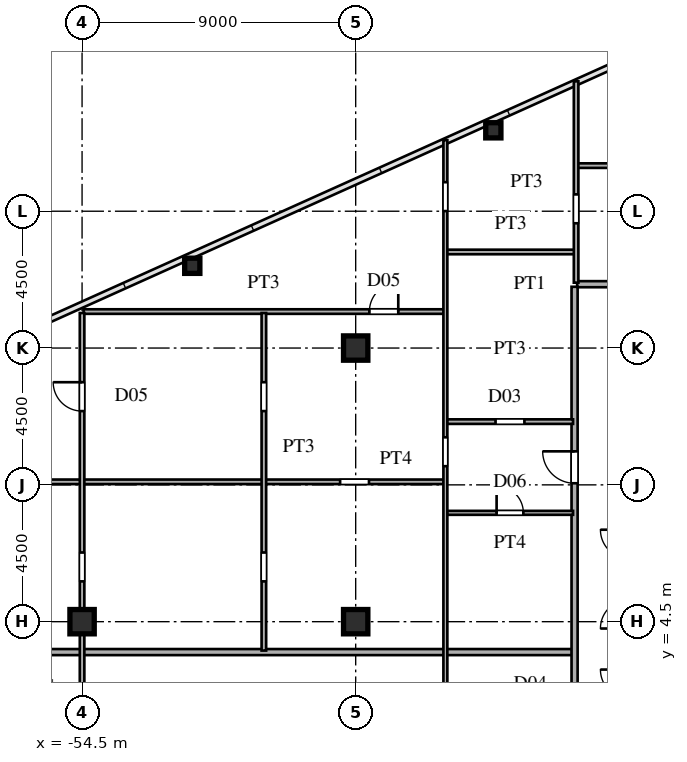
"""IFC4 building model, lengths in metres.
Left out: names, types, materials, properties, quantities, classifications, styles, units other than length and angle.
Written with IfcOpenShell. Run it as: python <this file> out.ifc"""

import sys

from ifc_helpers import new_model, si_unit, direction, frame, frame_2d, origin, origin_2d, place, context, subcontext, project, spatial, rectangle, hollow_rectangle, i_section, extrude, source, transform, mapped, element, fill, save


model = new_model("IFC4")
c1 = context("Model", 3, precision=1e-05, world=origin(), true_north=direction((0.0, 1.0)))
c2 = subcontext(c1, "Body", "Model", "MODEL_VIEW")
j1 = project(units=[si_unit("LENGTHUNIT", "METRE"), si_unit("PLANEANGLEUNIT", "RADIAN")], contexts=[c1])
p1 = place(None, origin())
s1 = spatial("IfcSite", under=j1, at=p1, CompositionType="ELEMENT")
p2 = place(p1, origin())
s2 = spatial("IfcBuilding", under=s1, at=p2, CompositionType="ELEMENT")
p3 = place(p2, frame((0.0, 0.0, 103.2)))
s3 = spatial("IfcBuildingStorey", under=s2, at=p3, CompositionType="ELEMENT", Elevation=103.2)
m1 = source(origin(), c2, "Body", "SweptSolid", [
    extrude(i_section(OverallWidth=0.8, OverallDepth=0.8, WebThickness=0.032, FlangeThickness=0.05, at=origin_2d()), origin(), (0.0, 0.0, 1.0), 3.6),
])
for number, where, z_axis, x_axis in (
    (1, (-45.5, 4.5, 0.0), (0.0, 0.0, 1.0), (1.0, 0.0, 0.0)),
    (2, (-45.5, 13.5, 0.0), (0.0, 0.0, 1.0), (1.0, 0.0, 0.0)),
    (3, (-54.5, 4.5, 0.0), (0.0, 0.0, 1.0), (1.0, 0.0, 0.0)),
):
    element("IfcColumn", number, at=place(p3, frame(where, z_axis=z_axis, x_axis=x_axis)), inside=s3, PredefinedType="COLUMN", context=c2, shape_type="MappedRepresentation", body=[
        mapped(m1, transform((0.0, 0.0, 0.0), scale=1.0)),
    ])
m2 = source(origin(), c2, "Body", "SweptSolid", [
    extrude(hollow_rectangle(XDim=0.5, YDim=0.5, WallThickness=0.02, at=origin_2d()), origin(), (0.0, 0.0, 1.0), 3.6),
])
for number, where, z_axis, x_axis in (
    (4, (-40.973, 20.661, 0.0), (0.0, 0.0, 1.0), (1.0, 0.0, 0.0)),
    (5, (-50.875, 16.205, 0.0), (0.0, 0.0, 1.0), (1.0, 0.0, 0.0)),
):
    element("IfcColumn", number, at=place(p3, frame(where, z_axis=z_axis, x_axis=x_axis)), inside=s3, PredefinedType="COLUMN", context=c2, shape_type="MappedRepresentation", body=[
        mapped(m2, transform((0.0, 0.0, 0.0), scale=1.0)),
    ])
p4 = place(p3, frame((-71.005, 3.5, 0.0), z_axis=(0.0, 0.0, 1.0), x_axis=(1.0, 0.0, 0.0)))
e6 = element("IfcWall", 6, at=p4, inside=s3, PredefinedType="PARTITIONING", context=c2, shape_type="SweptSolid", body=[
    extrude(rectangle(XDim=32.625, YDim=0.2, at=frame_2d((16.312, 0.0))), origin(), (0.0, 0.0, 1.0), 3.38),
])
p5 = place(p3, frame((-42.5, 8.08, 0.0), z_axis=(0.0, 0.0, 1.0), x_axis=(1.0, 0.0, 0.0)))
e7 = element("IfcWall", 7, at=p5, inside=s3, PredefinedType="PARTITIONING", context=c2, shape_type="SweptSolid", body=[
    extrude(rectangle(XDim=4.15, YDim=0.13, at=frame_2d((2.075, 0.0))), origin(), (0.0, 0.0, 1.0), 3.38),
])
p6 = place(p5, frame((1.635, 0.0, 0.0)))
e8 = element("IfcOpeningElement", 8, at=p6, cuts=e7, PredefinedType="OPENING", context=c2, shape_type="SweptSolid", body=[
    extrude(rectangle(XDim=0.88, YDim=2.1, at=frame_2d((0.44, 1.05))), frame((0.0, 0.075, 0.0), z_axis=(0.0, -1.0, 0.0), x_axis=(1.0, 0.0, 0.0)), (0.0, 0.0, 1.0), 0.15),
])
p7 = place(p3, frame((-67.478, 9.1, 0.0), z_axis=(0.0, 0.0, 1.0), x_axis=(1.0, 0.0, 0.0)))
e9 = element("IfcWall", 9, at=p7, inside=s3, PredefinedType="PARTITIONING", context=c2, shape_type="SweptSolid", body=[
    extrude(rectangle(XDim=24.878, YDim=0.15, at=frame_2d((12.439, 0.0))), origin(), (0.0, 0.0, 1.0), 3.38),
])
p8 = place(p7, frame((21.466, 0.0, 0.0)))
e10 = element("IfcOpeningElement", 10, at=p8, cuts=e9, PredefinedType="OPENING", context=c2, shape_type="SweptSolid", body=[
    extrude(rectangle(XDim=0.95, YDim=2.15, at=frame_2d((0.475, 1.075))), frame((0.0, 0.085, 0.0), z_axis=(0.0, -1.0, 0.0), x_axis=(1.0, 0.0, 0.0)), (0.0, 0.0, 1.0), 0.17),
])
p9 = place(p3, frame((-42.5, 11.08, 0.0), z_axis=(0.0, 0.0, 1.0), x_axis=(1.0, 0.0, 0.0)))
e11 = element("IfcWall", 11, at=p9, inside=s3, PredefinedType="PARTITIONING", context=c2, shape_type="SweptSolid", body=[
    extrude(rectangle(XDim=4.15, YDim=0.15, at=frame_2d((2.075, 0.0))), origin(), (0.0, 0.0, 1.0), 3.38),
])
p10 = place(p9, frame((1.6, 0.0, 0.0)))
e12 = element("IfcOpeningElement", 12, at=p10, cuts=e11, PredefinedType="OPENING", context=c2, shape_type="SweptSolid", body=[
    extrude(rectangle(XDim=0.95, YDim=2.15, at=frame_2d((0.475, 1.075))), frame((0.0, 0.085, 0.0), z_axis=(0.0, -1.0, 0.0), x_axis=(1.0, 0.0, 0.0)), (0.0, 0.0, 1.0), 0.17),
])
p11 = place(p3, frame((-54.45, 14.7, 0.0), z_axis=(0.0, 0.0, 1.0), x_axis=(1.0, 0.0, 0.0)))
e13 = element("IfcWall", 13, at=p11, inside=s3, PredefinedType="PARTITIONING", context=c2, shape_type="SweptSolid", body=[
    extrude(rectangle(XDim=11.85, YDim=0.15, at=frame_2d((5.925, 0.0))), origin(), (0.0, 0.0, 1.0), 3.38),
])
p12 = place(p11, frame((9.401, 0.0, 0.0)))
e14 = element("IfcOpeningElement", 14, at=p12, cuts=e13, PredefinedType="OPENING", context=c2, shape_type="SweptSolid", body=[
    extrude(rectangle(XDim=0.95, YDim=2.15, at=frame_2d((0.475, 1.075))), frame((0.0, 0.085, 0.0), z_axis=(0.0, -1.0, 0.0), x_axis=(1.0, 0.0, 0.0)), (0.0, 0.0, 1.0), 0.17),
])
p13 = place(p3, frame((-38.215, 15.6, 0.0), z_axis=(0.0, 0.0, 1.0), x_axis=(1.0, 0.0, 0.0)))
e15 = element("IfcWall", 15, at=p13, inside=s3, PredefinedType="PARTITIONING", context=c2, shape_type="SweptSolid", body=[
    extrude(rectangle(XDim=1.63, YDim=0.2, at=frame_2d((0.815, 0.0))), origin(), (0.0, 0.0, 1.0), 3.38),
])
p14 = place(p3, frame((-42.5, 16.66, 0.0), z_axis=(0.0, 0.0, 1.0), x_axis=(1.0, 0.0, 0.0)))
e16 = element("IfcWall", 16, at=p14, inside=s3, PredefinedType="PARTITIONING", context=c2, shape_type="SweptSolid", body=[
    extrude(rectangle(XDim=4.2, YDim=0.15, at=frame_2d((2.1, 0.0))), origin(), (0.0, 0.0, 1.0), 3.38),
])
p15 = place(p3, frame((-38.2, 19.5, 0.0), z_axis=(0.0, 0.0, 1.0), x_axis=(1.0, 0.0, 0.0)))
e17 = element("IfcWall", 17, at=p15, inside=s3, PredefinedType="PARTITIONING", context=c2, shape_type="SweptSolid", body=[
    extrude(rectangle(XDim=10.735, YDim=0.15, at=frame_2d((5.367, 0.0))), origin(), (0.0, 0.0, 1.0), 3.38),
])
p16 = place(p15, frame((4.85, 0.0, 0.0)))
e18 = element("IfcOpeningElement", 18, at=p16, cuts=e17, PredefinedType="OPENING", context=c2, shape_type="SweptSolid", body=[
    extrude(rectangle(XDim=0.95, YDim=2.15, at=frame_2d((0.475, 1.075))), frame((0.0, 0.085, 0.0), z_axis=(0.0, -1.0, 0.0), x_axis=(1.0, 0.0, 0.0)), (0.0, 0.0, 1.0), 0.17),
])
p17 = place(p3, frame((-54.5, -14.96, 0.0), z_axis=(0.0, 0.0, 1.0), x_axis=(0.0, 1.0, 0.0)))
e19 = element("IfcWall", 19, at=p17, inside=s3, PredefinedType="PARTITIONING", context=c2, shape_type="SweptSolid", body=[
    extrude(rectangle(XDim=29.612, YDim=0.15, at=frame_2d((14.806, 0.0))), origin(), (0.0, 0.0, 1.0), 2.68),
])
p18 = place(p17, frame((1.772, 0.0, 0.0)))
e20 = element("IfcOpeningElement", 20, at=p18, cuts=e19, PredefinedType="OPENING", context=c2, shape_type="SweptSolid", body=[
    extrude(rectangle(XDim=0.95, YDim=2.15, at=frame_2d((0.475, 1.075))), frame((0.0, 0.085, 0.0), z_axis=(0.0, -1.0, 0.0), x_axis=(1.0, 0.0, 0.0)), (0.0, 0.0, 1.0), 0.17),
])
p19 = place(p17, frame((10.985, 0.0, 0.0)))
e21 = element("IfcOpeningElement", 21, at=p19, cuts=e19, PredefinedType="OPENING", context=c2, shape_type="SweptSolid", body=[
    extrude(rectangle(XDim=0.95, YDim=2.15, at=frame_2d((0.475, 1.075))), frame((0.0, 0.085, 0.0), z_axis=(0.0, -1.0, 0.0), x_axis=(1.0, 0.0, 0.0)), (0.0, 0.0, 1.0), 0.17),
])
p20 = place(p17, frame((26.386, 0.0, 0.0)))
e22 = element("IfcOpeningElement", 22, at=p20, cuts=e19, PredefinedType="OPENING", context=c2, shape_type="SweptSolid", body=[
    extrude(rectangle(XDim=0.95, YDim=2.15, at=frame_2d((0.475, 1.075))), frame((0.0, 0.085, 0.0), z_axis=(0.0, -1.0, 0.0), x_axis=(1.0, 0.0, 0.0)), (0.0, 0.0, 1.0), 0.17),
])
p21 = place(p17, frame((20.785, 0.0, 0.0)))
e23 = element("IfcOpeningElement", 23, at=p21, cuts=e19, PredefinedType="OPENING", context=c2, shape_type="SweptSolid", body=[
    extrude(rectangle(XDim=0.95, YDim=2.15, at=frame_2d((0.475, 1.075))), frame((0.0, 0.085, 0.0), z_axis=(0.0, -1.0, 0.0), x_axis=(1.0, 0.0, 0.0)), (0.0, 0.0, 1.0), 0.17),
])
p22 = place(p3, frame((-48.52, 3.55, 0.0), z_axis=(0.0, 0.0, 1.0), x_axis=(0.0, 1.0, 0.0)))
e24 = element("IfcWall", 24, at=p22, inside=s3, PredefinedType="PARTITIONING", context=c2, shape_type="SweptSolid", body=[
    extrude(rectangle(XDim=11.102, YDim=0.15, at=frame_2d((5.551, 0.0))), origin(), (0.0, 0.0, 1.0), 3.38),
])
p23 = place(p22, frame((7.876, 0.0, 0.0)))
e25 = element("IfcOpeningElement", 25, at=p23, cuts=e24, PredefinedType="OPENING", context=c2, shape_type="SweptSolid", body=[
    extrude(rectangle(XDim=0.95, YDim=2.15, at=frame_2d((0.475, 1.075))), frame((0.0, 0.085, 0.0), z_axis=(0.0, -1.0, 0.0), x_axis=(1.0, 0.0, 0.0)), (0.0, 0.0, 1.0), 0.17),
])
p24 = place(p22, frame((2.275, 0.0, 0.0)))
e26 = element("IfcOpeningElement", 26, at=p24, cuts=e24, PredefinedType="OPENING", context=c2, shape_type="SweptSolid", body=[
    extrude(rectangle(XDim=0.95, YDim=2.15, at=frame_2d((0.475, 1.075))), frame((0.0, 0.085, 0.0), z_axis=(0.0, -1.0, 0.0), x_axis=(1.0, 0.0, 0.0)), (0.0, 0.0, 1.0), 0.17),
])
p25 = place(p3, frame((-42.55, -0.648, 0.0), z_axis=(0.0, 0.0, 1.0), x_axis=(0.0, 1.0, 0.0)))
e27 = element("IfcWall", 27, at=p25, inside=s3, PredefinedType="PARTITIONING", context=c2, shape_type="SweptSolid", body=[
    extrude(rectangle(XDim=20.985, YDim=0.13, at=frame_2d((10.492, 0.0))), origin(), (0.0, 0.0, 1.0), 3.38),
])
p26 = place(p25, frame((10.262, 0.0, 0.0)))
e28 = element("IfcOpeningElement", 28, at=p26, cuts=e27, PredefinedType="OPENING", context=c2, shape_type="SweptSolid", body=[
    extrude(rectangle(XDim=0.95, YDim=2.15, at=frame_2d((0.475, 1.075))), frame((0.0, 0.075, 0.0), z_axis=(0.0, -1.0, 0.0), x_axis=(1.0, 0.0, 0.0)), (0.0, 0.0, 1.0), 0.15),
])
p27 = place(p25, frame((18.653, 0.0, 0.0)))
e29 = element("IfcOpeningElement", 29, at=p27, cuts=e27, PredefinedType="OPENING", context=c2, shape_type="SweptSolid", body=[
    extrude(rectangle(XDim=0.95, YDim=2.15, at=frame_2d((0.475, 1.075))), frame((0.0, 0.075, 0.0), z_axis=(0.0, -1.0, 0.0), x_axis=(1.0, 0.0, 0.0)), (0.0, 0.0, 1.0), 0.15),
])
p28 = place(p3, frame((-38.3, -15.515, 0.0), z_axis=(0.0, 0.0, 1.0), x_axis=(0.0, 1.0, 0.0)))
e30 = element("IfcWall", 30, at=p28, inside=s3, PredefinedType="PARTITIONING", context=c2, shape_type="SweptSolid", body=[
    extrude(rectangle(XDim=31.03, YDim=0.2, at=frame_2d((15.515, 0.0))), origin(), (0.0, 0.0, 1.0), 3.38),
])
p29 = place(p28, frame((0.617, 0.0, 0.0)))
e31 = element("IfcOpeningElement", 31, at=p29, cuts=e30, PredefinedType="OPENING", context=c2, shape_type="SweptSolid", body=[
    extrude(rectangle(XDim=1.05, YDim=2.25, at=frame_2d((0.525, 1.125))), frame((0.0, 0.11, 0.0), z_axis=(0.0, -1.0, 0.0), x_axis=(1.0, 0.0, 0.0)), (0.0, 0.0, 1.0), 0.22),
])
p30 = place(p28, frame((11.28, 0.0, 0.0)))
e32 = element("IfcOpeningElement", 32, at=p30, cuts=e30, PredefinedType="OPENING", context=c2, shape_type="SweptSolid", body=[
    extrude(rectangle(XDim=1.05, YDim=2.25, at=frame_2d((0.525, 1.125))), frame((0.0, 0.11, 0.0), z_axis=(0.0, -1.0, 0.0), x_axis=(1.0, 0.0, 0.0)), (0.0, 0.0, 1.0), 0.22),
])
p31 = place(p28, frame((24.567, 0.0, 0.0)))
e33 = element("IfcOpeningElement", 33, at=p31, cuts=e30, PredefinedType="OPENING", context=c2, shape_type="SweptSolid", body=[
    extrude(rectangle(XDim=1.05, YDim=2.25, at=frame_2d((0.525, 1.125))), frame((0.0, 0.11, 0.0), z_axis=(0.0, -1.0, 0.0), x_axis=(1.0, 0.0, 0.0)), (0.0, 0.0, 1.0), 0.22),
])
p32 = place(p3, frame((-38.25, 15.65, 0.0), z_axis=(0.0, 0.0, 1.0), x_axis=(0.0, 1.0, 0.0)))
e34 = element("IfcWall", 34, at=p32, inside=s3, PredefinedType="PARTITIONING", context=c2, shape_type="SweptSolid", body=[
    extrude(rectangle(XDim=6.623, YDim=0.15, at=frame_2d((3.312, 0.0))), origin(), (0.0, 0.0, 1.0), 3.38),
])
p33 = place(p32, frame((1.954, 0.0, 0.0)))
e35 = element("IfcOpeningElement", 35, at=p33, cuts=e34, PredefinedType="OPENING", context=c2, shape_type="SweptSolid", body=[
    extrude(rectangle(XDim=0.95, YDim=2.15, at=frame_2d((0.475, 1.075))), frame((0.0, 0.085, 0.0), z_axis=(0.0, -1.0, 0.0), x_axis=(1.0, 0.0, 0.0)), (0.0, 0.0, 1.0), 0.17),
])
m3 = source(origin(), c2, "Body", "SweptSolid", [
    extrude(rectangle(XDim=0.88, YDim=2.1, at=frame_2d((0.44, 1.05))), frame((0.0, 0.025, 0.0), z_axis=(0.0, -1.0, 0.0), x_axis=(1.0, 0.0, 0.0)), (0.0, 0.0, 1.0), 0.05),
])
p34 = place(p6, origin())
e36 = element("IfcDoor", 36, at=p34, inside=s3, OperationType="SINGLE_SWING_LEFT", PredefinedType="DOOR", context=c2, shape_type="MappedRepresentation", body=[
    mapped(m3, transform((0.0, 0.0, 0.0), scale=1.0)),
])
fill(e8, e36)
m4 = source(origin(), c2, "Body", "SweptSolid", [
    extrude(rectangle(XDim=0.95, YDim=2.15, at=frame_2d((0.475, 1.075))), frame((0.0, 0.025, 0.0), z_axis=(0.0, -1.0, 0.0), x_axis=(1.0, 0.0, 0.0)), (0.0, 0.0, 1.0), 0.05),
])
p35 = place(p12, origin())
e37 = element("IfcDoor", 37, at=p35, inside=s3, OperationType="SINGLE_SWING_RIGHT", PredefinedType="DOOR", context=c2, shape_type="MappedRepresentation", body=[
    mapped(m4, transform((0.0, 0.0, 0.0), scale=1.0)),
])
fill(e14, e37)
p36 = place(p20, origin())
e38 = element("IfcDoor", 38, at=p36, inside=s3, OperationType="SINGLE_SWING_RIGHT", PredefinedType="DOOR", context=c2, shape_type="MappedRepresentation", body=[
    mapped(m4, transform((0.0, 0.0, 0.0), scale=1.0)),
])
fill(e22, e38)
m5 = source(origin(), c2, "Body", "SweptSolid", [
    extrude(rectangle(XDim=1.05, YDim=2.25, at=frame_2d((0.525, 1.125))), frame((0.0, 0.025, 0.0), z_axis=(0.0, -1.0, 0.0), x_axis=(1.0, 0.0, 0.0)), (0.0, 0.0, 1.0), 0.05),
])
p37 = place(p31, origin())
e39 = element("IfcDoor", 39, at=p37, inside=s3, OperationType="SINGLE_SWING_RIGHT", PredefinedType="DOOR", context=c2, shape_type="MappedRepresentation", body=[
    mapped(m5, transform((0.0, 0.0, 0.0), scale=1.0)),
])
fill(e33, e39)
save(model, sys.argv[1])
